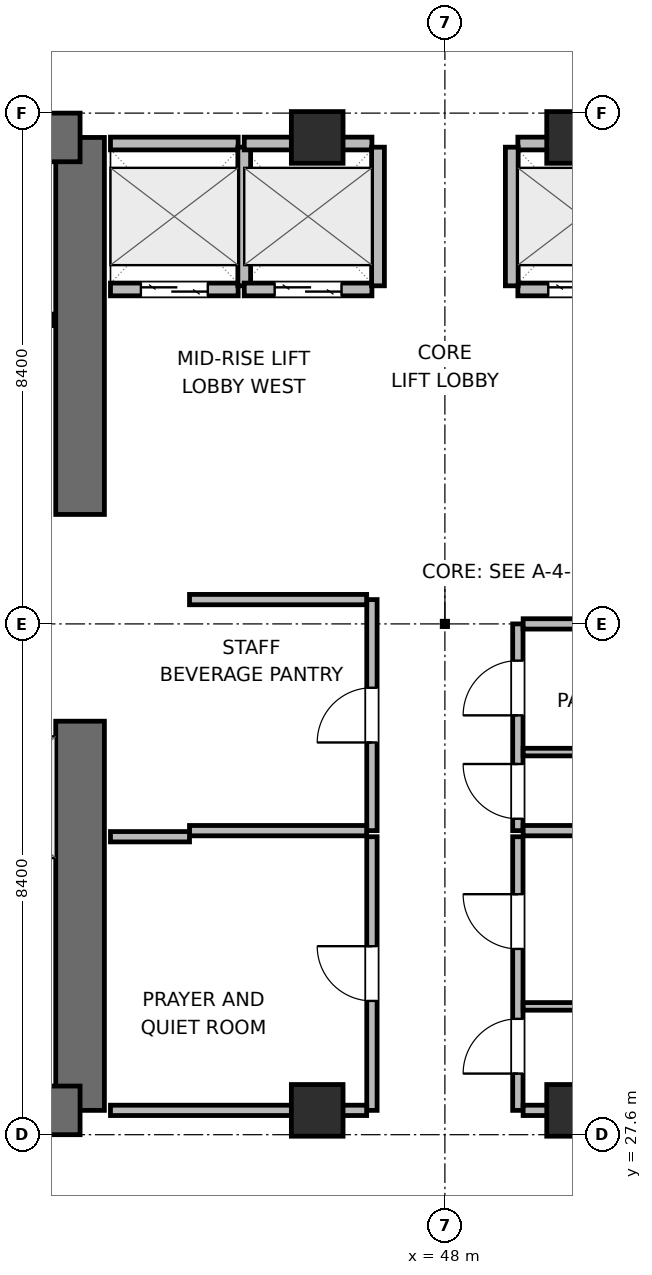
"""IFC4 building model, lengths in metres.
Left out: names, types, materials, properties, quantities, classifications, styles, units other than length and angle.
Written with IfcOpenShell. Run it as: python <this file> out.ifc"""

import sys

from ifc_helpers import new_model, si_unit, direction, frame, frame_2d, origin, origin_2d, place, context, subcontext, project, spatial, rectangle, extrude, element, fill, save


model = new_model("IFC4")
c1 = context("Model", 3, precision=1e-05, world=origin(), true_north=direction((0.0, 1.0)))
c2 = subcontext(c1, "Body", "Model", "MODEL_VIEW")
j1 = project(units=[si_unit("LENGTHUNIT", "METRE"), si_unit("PLANEANGLEUNIT", "RADIAN")], contexts=[c1])
p1 = place(None, origin())
s1 = spatial("IfcSite", under=j1, at=p1, CompositionType="ELEMENT")
p2 = place(p1, origin())
s2 = spatial("IfcBuilding", under=s1, at=p2, CompositionType="ELEMENT")
p3 = place(p2, frame((0.0, 0.0, 150.6)))
s3 = spatial("IfcBuildingStorey", under=s2, at=p3, CompositionType="ELEMENT", Elevation=150.6)
p4 = place(p3, frame((42.0, 28.0, 0.0), z_axis=(0.0, 0.0, 1.0), x_axis=(0.0, 1.0, 0.0)))
e1 = element("IfcWall", 1, at=p4, inside=s3, PredefinedType="SHEAR", context=c2, shape_type="SweptSolid", body=[
    extrude(rectangle(XDim=6.4, YDim=0.8, at=frame_2d((3.2, 0.0))), origin(), (0.0, 0.0, 1.0), 3.9),
])
p5 = place(p3, frame((42.0, 37.8, 0.0), z_axis=(0.0, 0.0, 1.0), x_axis=(0.0, 1.0, 0.0)))
e2 = element("IfcWall", 2, at=p5, inside=s3, PredefinedType="SHEAR", context=c2, shape_type="SweptSolid", body=[
    extrude(rectangle(XDim=6.2, YDim=0.8, at=frame_2d((3.1, 0.0))), origin(), (0.0, 0.0, 1.0), 3.9),
])
p6 = place(p3, frame((32.8, 28.0, 0.0), z_axis=(0.0, 0.0, 1.0), x_axis=(1.0, 0.0, 0.0)))
e3 = element("IfcWall", 3, at=p6, inside=s3, PredefinedType="SHEAR", context=c2, shape_type="SweptSolid", body=[
    extrude(rectangle(XDim=9.2, YDim=0.8, at=frame_2d((4.6, 0.0))), origin(), (0.0, 0.0, 1.0), 3.9),
])
p7 = place(p6, frame((5.025, 0.0, 0.0)))
e4 = element("IfcOpeningElement", 4, at=p7, cuts=e3, PredefinedType="OPENING", context=c2, shape_type="SweptSolid", body=[
    extrude(rectangle(XDim=1.05, YDim=2.04, at=frame_2d((0.525, 1.02))), frame((0.0, 0.41, 0.0), z_axis=(0.0, -1.0, 0.0), x_axis=(1.0, 0.0, 0.0)), (0.0, 0.0, 1.0), 0.82),
])
p8 = place(p3, frame((32.8, 44.0, 0.0), z_axis=(0.0, 0.0, 1.0), x_axis=(1.0, 0.0, 0.0)))
e5 = element("IfcWall", 5, at=p8, inside=s3, PredefinedType="SHEAR", context=c2, shape_type="SweptSolid", body=[
    extrude(rectangle(XDim=9.2, YDim=0.8, at=frame_2d((4.6, 0.0))), origin(), (0.0, 0.0, 1.0), 3.9),
])
p9 = place(p8, frame((1.025, 0.0, 0.0)))
e6 = element("IfcOpeningElement", 6, at=p9, cuts=e5, PredefinedType="OPENING", context=c2, shape_type="SweptSolid", body=[
    extrude(rectangle(XDim=0.95, YDim=2.04, at=frame_2d((0.475, 1.02))), frame((0.0, 0.41, 0.0), z_axis=(0.0, -1.0, 0.0), x_axis=(1.0, 0.0, 0.0)), (0.0, 0.0, 1.0), 0.82),
])
p10 = place(p8, frame((4.275, 0.0, 0.0)))
e7 = element("IfcOpeningElement", 7, at=p10, cuts=e5, PredefinedType="OPENING", context=c2, shape_type="SweptSolid", body=[
    extrude(rectangle(XDim=0.9, YDim=2.02, at=frame_2d((0.45, 1.01))), frame((0.0, 0.41, 0.0), z_axis=(0.0, -1.0, 0.0), x_axis=(1.0, 0.0, 0.0)), (0.0, 0.0, 1.0), 0.82),
])
p11 = place(p8, frame((7.175, 0.0, 0.0)))
e8 = element("IfcOpeningElement", 8, at=p11, cuts=e5, PredefinedType="OPENING", context=c2, shape_type="SweptSolid", body=[
    extrude(rectangle(XDim=0.9, YDim=2.02, at=frame_2d((0.45, 1.01))), frame((0.0, 0.41, 0.0), z_axis=(0.0, -1.0, 0.0), x_axis=(1.0, 0.0, 0.0)), (0.0, 0.0, 1.0), 0.82),
])
for number, where, z_axis, x_axis in (
    (9, (45.9, 28.0, 0.0), (0.0, 0.0, 1.0), (1.0, 0.0, 0.0)),
    (10, (50.1, 28.0, 0.0), (0.0, 0.0, 1.0), (1.0, 0.0, 0.0)),
    (11, (45.9, 44.0, 0.0), (0.0, 0.0, 1.0), (1.0, 0.0, 0.0)),
    (12, (50.1, 44.0, 0.0), (0.0, 0.0, 1.0), (1.0, 0.0, 0.0)),
):
    element("IfcColumn", number, at=place(p3, frame(where, z_axis=z_axis, x_axis=x_axis)), inside=s3, PredefinedType="COLUMN", context=c2, shape_type="SweptSolid", body=[
        extrude(rectangle(XDim=0.85, YDim=0.85, at=origin_2d()), origin(), (0.0, 0.0, 1.0), 3.9),
    ])
p12 = place(p3, frame((33.25, 41.0, 0.0), z_axis=(0.0, 0.0, 1.0), x_axis=(1.0, 0.0, 0.0)))
e13 = element("IfcWall", 13, at=p12, inside=s3, PredefinedType="PLUMBINGWALL", context=c2, shape_type="SweptSolid", body=[
    extrude(rectangle(XDim=8.3, YDim=0.19, at=frame_2d((4.15, 0.0))), origin(), (0.0, 0.0, 1.0), 3.68),
])
p13 = place(p3, frame((42.5, 41.5, 0.0), z_axis=(0.0, 0.0, 1.0), x_axis=(1.0, 0.0, 0.0)))
e14 = element("IfcWall", 14, at=p13, inside=s3, PredefinedType="PARTITIONING", context=c2, shape_type="SweptSolid", body=[
    extrude(rectangle(XDim=2.1, YDim=0.21, at=frame_2d((1.05, 0.0))), origin(), (0.0, 0.0, 1.0), 3.68),
])
p14 = place(p13, frame((0.5, 0.0, 0.0)))
e15 = element("IfcOpeningElement", 15, at=p14, cuts=e14, PredefinedType="OPENING", context=c2, shape_type="SweptSolid", body=[
    extrude(rectangle(XDim=1.1, YDim=2.04, at=frame_2d((0.55, 1.02))), frame((0.0, 0.115, 0.0), z_axis=(0.0, -1.0, 0.0), x_axis=(1.0, 0.0, 0.0)), (0.0, 0.0, 1.0), 0.23),
])
p15 = place(p3, frame((42.5, 43.9, 0.0), z_axis=(0.0, 0.0, 1.0), x_axis=(1.0, 0.0, 0.0)))
e16 = element("IfcWall", 16, at=p15, inside=s3, PredefinedType="PARTITIONING", context=c2, shape_type="SweptSolid", body=[
    extrude(rectangle(XDim=2.1, YDim=0.21, at=frame_2d((1.05, 0.0))), origin(), (0.0, 0.0, 1.0), 2.565),
])
p16 = place(p3, frame((44.7, 41.56, 0.0), z_axis=(0.0, 0.0, 1.0), x_axis=(0.0, 1.0, 0.0)))
e17 = element("IfcWall", 17, at=p16, inside=s3, PredefinedType="PARTITIONING", context=c2, shape_type="SweptSolid", body=[
    extrude(rectangle(XDim=2.28, YDim=0.21, at=frame_2d((1.14, 0.0))), origin(), (0.0, 0.0, 1.0), 3.68),
])
p17 = place(p3, frame((44.7, 41.5, 0.0), z_axis=(0.0, 0.0, 1.0), x_axis=(1.0, 0.0, 0.0)))
e18 = element("IfcWall", 18, at=p17, inside=s3, PredefinedType="PARTITIONING", context=c2, shape_type="SweptSolid", body=[
    extrude(rectangle(XDim=2.1, YDim=0.21, at=frame_2d((1.05, 0.0))), origin(), (0.0, 0.0, 1.0), 3.68),
])
p18 = place(p17, frame((0.5, 0.0, 0.0)))
e19 = element("IfcOpeningElement", 19, at=p18, cuts=e18, PredefinedType="OPENING", context=c2, shape_type="SweptSolid", body=[
    extrude(rectangle(XDim=1.1, YDim=2.04, at=frame_2d((0.55, 1.02))), frame((0.0, 0.115, 0.0), z_axis=(0.0, -1.0, 0.0), x_axis=(1.0, 0.0, 0.0)), (0.0, 0.0, 1.0), 0.23),
])
p19 = place(p3, frame((44.7, 43.9, 0.0), z_axis=(0.0, 0.0, 1.0), x_axis=(1.0, 0.0, 0.0)))
e20 = element("IfcWall", 20, at=p19, inside=s3, PredefinedType="PARTITIONING", context=c2, shape_type="SweptSolid", body=[
    extrude(rectangle(XDim=2.1, YDim=0.21, at=frame_2d((1.05, 0.0))), origin(), (0.0, 0.0, 1.0), 2.565),
])
p20 = place(p3, frame((46.9, 41.56, 0.0), z_axis=(0.0, 0.0, 1.0), x_axis=(0.0, 1.0, 0.0)))
e21 = element("IfcWall", 21, at=p20, inside=s3, PredefinedType="PARTITIONING", context=c2, shape_type="SweptSolid", body=[
    extrude(rectangle(XDim=2.28, YDim=0.21, at=frame_2d((1.14, 0.0))), origin(), (0.0, 0.0, 1.0), 3.68),
])
p21 = place(p3, frame((49.2, 41.5, 0.0), z_axis=(0.0, 0.0, 1.0), x_axis=(1.0, 0.0, 0.0)))
e22 = element("IfcWall", 22, at=p21, inside=s3, PredefinedType="PARTITIONING", context=c2, shape_type="SweptSolid", body=[
    extrude(rectangle(XDim=2.1, YDim=0.21, at=frame_2d((1.05, 0.0))), origin(), (0.0, 0.0, 1.0), 3.68),
])
p22 = place(p21, frame((0.5, 0.0, 0.0)))
e23 = element("IfcOpeningElement", 23, at=p22, cuts=e22, PredefinedType="OPENING", context=c2, shape_type="SweptSolid", body=[
    extrude(rectangle(XDim=1.1, YDim=2.04, at=frame_2d((0.55, 1.02))), frame((0.0, 0.115, 0.0), z_axis=(0.0, -1.0, 0.0), x_axis=(1.0, 0.0, 0.0)), (0.0, 0.0, 1.0), 0.23),
])
p23 = place(p3, frame((49.2, 43.9, 0.0), z_axis=(0.0, 0.0, 1.0), x_axis=(1.0, 0.0, 0.0)))
e24 = element("IfcWall", 24, at=p23, inside=s3, PredefinedType="PARTITIONING", context=c2, shape_type="SweptSolid", body=[
    extrude(rectangle(XDim=2.1, YDim=0.21, at=frame_2d((1.05, 0.0))), origin(), (0.0, 0.0, 1.0), 2.565),
])
p24 = place(p3, frame((49.1, 41.56, 0.0), z_axis=(0.0, 0.0, 1.0), x_axis=(0.0, 1.0, 0.0)))
e25 = element("IfcWall", 25, at=p24, inside=s3, PredefinedType="PARTITIONING", context=c2, shape_type="SweptSolid", body=[
    extrude(rectangle(XDim=2.28, YDim=0.21, at=frame_2d((1.14, 0.0))), origin(), (0.0, 0.0, 1.0), 3.68),
])
p25 = place(p3, frame((46.8, 32.6, 0.0), z_axis=(0.0, 0.0, 1.0), x_axis=(0.0, 1.0, 0.0)))
e26 = element("IfcWall", 26, at=p25, inside=s3, PredefinedType="PARTITIONING", context=c2, shape_type="SweptSolid", body=[
    extrude(rectangle(XDim=3.8, YDim=0.17, at=frame_2d((1.9, 0.0))), origin(), (0.0, 0.0, 1.0), 3.68),
])
p26 = place(p25, frame((1.45, 0.0, 0.0)))
e27 = element("IfcOpeningElement", 27, at=p26, cuts=e26, PredefinedType="OPENING", context=c2, shape_type="SweptSolid", body=[
    extrude(rectangle(XDim=0.9, YDim=2.02, at=frame_2d((0.45, 1.01))), frame((0.0, 0.095, 0.0), z_axis=(0.0, -1.0, 0.0), x_axis=(1.0, 0.0, 0.0)), (0.0, 0.0, 1.0), 0.19),
])
for number, where, z_axis, x_axis in (
    (28, (43.8, 32.6, 0.0), (0.0, 0.0, 1.0), (1.0, 0.0, 0.0)),
    (29, (43.8, 36.4, 0.0), (0.0, 0.0, 1.0), (1.0, 0.0, 0.0)),
):
    element("IfcWall", number, at=place(p3, frame(where, z_axis=z_axis, x_axis=x_axis)), inside=s3, PredefinedType="PARTITIONING", context=c2, shape_type="SweptSolid", body=[
        extrude(rectangle(XDim=2.913, YDim=0.17, at=frame_2d((1.457, 0.0))), origin(), (0.0, 0.0, 1.0), 3.68),
    ])
p27 = place(p3, frame((49.2, 32.6, 0.0), z_axis=(0.0, 0.0, 1.0), x_axis=(0.0, 1.0, 0.0)))
e30 = element("IfcWall", 30, at=p27, inside=s3, PredefinedType="PARTITIONING", context=c2, shape_type="SweptSolid", body=[
    extrude(rectangle(XDim=3.4, YDim=0.17, at=frame_2d((1.7, 0.0))), origin(), (0.0, 0.0, 1.0), 3.68),
])
p28 = place(p27, frame((0.196, 0.0, 0.0)))
e31 = element("IfcOpeningElement", 31, at=p28, cuts=e30, PredefinedType="OPENING", context=c2, shape_type="SweptSolid", body=[
    extrude(rectangle(XDim=0.9, YDim=2.02, at=frame_2d((0.45, 1.01))), frame((0.0, 0.095, 0.0), z_axis=(0.0, -1.0, 0.0), x_axis=(1.0, 0.0, 0.0)), (0.0, 0.0, 1.0), 0.19),
])
p29 = place(p27, frame((1.896, 0.0, 0.0)))
e32 = element("IfcOpeningElement", 32, at=p29, cuts=e30, PredefinedType="OPENING", context=c2, shape_type="SweptSolid", body=[
    extrude(rectangle(XDim=0.9, YDim=2.02, at=frame_2d((0.45, 1.01))), frame((0.0, 0.095, 0.0), z_axis=(0.0, -1.0, 0.0), x_axis=(1.0, 0.0, 0.0)), (0.0, 0.0, 1.0), 0.19),
])
for number, where, z_axis, x_axis in (
    (33, (49.287, 32.6, 0.0), (0.0, 0.0, 1.0), (1.0, 0.0, 0.0)),
    (34, (49.287, 36.0, 0.0), (0.0, 0.0, 1.0), (1.0, 0.0, 0.0)),
):
    element("IfcWall", number, at=place(p3, frame(where, z_axis=z_axis, x_axis=x_axis)), inside=s3, PredefinedType="PARTITIONING", context=c2, shape_type="SweptSolid", body=[
        extrude(rectangle(XDim=2.913, YDim=0.17, at=frame_2d((1.457, 0.0))), origin(), (0.0, 0.0, 1.0), 3.68),
    ])
p30 = place(p3, frame((49.287, 33.892, 0.0), z_axis=(0.0, 0.0, 1.0), x_axis=(1.0, 0.0, 0.0)))
e35 = element("IfcWall", 35, at=p30, inside=s3, PredefinedType="PARTITIONING", context=c2, shape_type="SweptSolid", body=[
    extrude(rectangle(XDim=2.913, YDim=0.125, at=frame_2d((1.457, 0.0))), origin(), (0.0, 0.0, 1.0), 3.68),
])
p31 = place(p3, frame((46.8, 28.0, 0.0), z_axis=(0.0, 0.0, 1.0), x_axis=(0.0, 1.0, 0.0)))
e36 = element("IfcWall", 36, at=p31, inside=s3, PredefinedType="PARTITIONING", context=c2, shape_type="SweptSolid", body=[
    extrude(rectangle(XDim=4.5, YDim=0.17, at=frame_2d((2.25, 0.0))), origin(), (0.0, 0.0, 1.0), 3.68),
])
p32 = place(p31, frame((1.8, 0.0, 0.0)))
e37 = element("IfcOpeningElement", 37, at=p32, cuts=e36, PredefinedType="OPENING", context=c2, shape_type="SweptSolid", body=[
    extrude(rectangle(XDim=0.9, YDim=2.02, at=frame_2d((0.45, 1.01))), frame((0.0, 0.095, 0.0), z_axis=(0.0, -1.0, 0.0), x_axis=(1.0, 0.0, 0.0)), (0.0, 0.0, 1.0), 0.19),
])
p33 = place(p3, frame((42.5, 28.0, 0.0), z_axis=(0.0, 0.0, 1.0), x_axis=(1.0, 0.0, 0.0)))
e38 = element("IfcWall", 38, at=p33, inside=s3, PredefinedType="PARTITIONING", context=c2, shape_type="SweptSolid", body=[
    extrude(rectangle(XDim=4.213, YDim=0.17, at=frame_2d((2.106, 0.0))), origin(), (0.0, 0.0, 1.0), 2.565),
])
p34 = place(p3, frame((42.5, 32.5, 0.0), z_axis=(0.0, 0.0, 1.0), x_axis=(1.0, 0.0, 0.0)))
e39 = element("IfcWall", 39, at=p34, inside=s3, PredefinedType="PARTITIONING", context=c2, shape_type="SweptSolid", body=[
    extrude(rectangle(XDim=1.3, YDim=0.17, at=frame_2d((0.65, 0.0))), origin(), (0.0, 0.0, 1.0), 3.68),
])
p35 = place(p3, frame((49.2, 28.0, 0.0), z_axis=(0.0, 0.0, 1.0), x_axis=(0.0, 1.0, 0.0)))
e40 = element("IfcWall", 40, at=p35, inside=s3, PredefinedType="PARTITIONING", context=c2, shape_type="SweptSolid", body=[
    extrude(rectangle(XDim=4.5, YDim=0.17, at=frame_2d((2.25, 0.0))), origin(), (0.0, 0.0, 1.0), 3.68),
])
p36 = place(p35, frame((0.605, 0.0, 0.0)))
e41 = element("IfcOpeningElement", 41, at=p36, cuts=e40, PredefinedType="OPENING", context=c2, shape_type="SweptSolid", body=[
    extrude(rectangle(XDim=0.9, YDim=2.02, at=frame_2d((0.45, 1.01))), frame((0.0, 0.095, 0.0), z_axis=(0.0, -1.0, 0.0), x_axis=(1.0, 0.0, 0.0)), (0.0, 0.0, 1.0), 0.19),
])
p37 = place(p35, frame((2.655, 0.0, 0.0)))
e42 = element("IfcOpeningElement", 42, at=p37, cuts=e40, PredefinedType="OPENING", context=c2, shape_type="SweptSolid", body=[
    extrude(rectangle(XDim=0.9, YDim=2.02, at=frame_2d((0.45, 1.01))), frame((0.0, 0.095, 0.0), z_axis=(0.0, -1.0, 0.0), x_axis=(1.0, 0.0, 0.0)), (0.0, 0.0, 1.0), 0.19),
])
p38 = place(p3, frame((49.287, 28.0, 0.0), z_axis=(0.0, 0.0, 1.0), x_axis=(1.0, 0.0, 0.0)))
e43 = element("IfcWall", 43, at=p38, inside=s3, PredefinedType="PARTITIONING", context=c2, shape_type="SweptSolid", body=[
    extrude(rectangle(XDim=4.213, YDim=0.17, at=frame_2d((2.106, 0.0))), origin(), (0.0, 0.0, 1.0), 2.565),
])
p39 = place(p3, frame((49.287, 29.71, 0.0), z_axis=(0.0, 0.0, 1.0), x_axis=(1.0, 0.0, 0.0)))
e44 = element("IfcWall", 44, at=p39, inside=s3, PredefinedType="PARTITIONING", context=c2, shape_type="SweptSolid", body=[
    extrude(rectangle(XDim=4.213, YDim=0.125, at=frame_2d((2.106, 0.0))), origin(), (0.0, 0.0, 1.0), 3.68),
])
p40 = place(p14, origin())
e45 = element("IfcDoor", 45, at=p40, inside=s3, OperationType="DOUBLE_DOOR_SLIDING", PredefinedType="DOOR", context=c2, shape_type="SweptSolid", body=[
    extrude(rectangle(XDim=1.1, YDim=2.04, at=frame_2d((0.55, 1.02))), frame((0.0, 0.025, 0.0), z_axis=(0.0, -1.0, 0.0), x_axis=(1.0, 0.0, 0.0)), (0.0, 0.0, 1.0), 0.05),
])
fill(e15, e45)
p41 = place(p18, origin())
e46 = element("IfcDoor", 46, at=p41, inside=s3, OperationType="DOUBLE_DOOR_SLIDING", PredefinedType="DOOR", context=c2, shape_type="SweptSolid", body=[
    extrude(rectangle(XDim=1.1, YDim=2.04, at=frame_2d((0.55, 1.02))), frame((0.0, 0.025, 0.0), z_axis=(0.0, -1.0, 0.0), x_axis=(1.0, 0.0, 0.0)), (0.0, 0.0, 1.0), 0.05),
])
fill(e19, e46)
p42 = place(p22, origin())
e47 = element("IfcDoor", 47, at=p42, inside=s3, OperationType="DOUBLE_DOOR_SLIDING", PredefinedType="DOOR", context=c2, shape_type="SweptSolid", body=[
    extrude(rectangle(XDim=1.1, YDim=2.04, at=frame_2d((0.55, 1.02))), frame((0.0, 0.025, 0.0), z_axis=(0.0, -1.0, 0.0), x_axis=(1.0, 0.0, 0.0)), (0.0, 0.0, 1.0), 0.05),
])
fill(e23, e47)
p43 = place(p26, origin())
e48 = element("IfcDoor", 48, at=p43, inside=s3, OperationType="SINGLE_SWING_LEFT", PredefinedType="DOOR", context=c2, shape_type="SweptSolid", body=[
    extrude(rectangle(XDim=0.9, YDim=2.02, at=frame_2d((0.45, 1.01))), frame((0.0, 0.025, 0.0), z_axis=(0.0, -1.0, 0.0), x_axis=(1.0, 0.0, 0.0)), (0.0, 0.0, 1.0), 0.05),
])
fill(e27, e48)
p44 = place(p28, origin())
e49 = element("IfcDoor", 49, at=p44, inside=s3, OperationType="SINGLE_SWING_RIGHT", PredefinedType="DOOR", context=c2, shape_type="SweptSolid", body=[
    extrude(rectangle(XDim=0.9, YDim=2.02, at=frame_2d((0.45, 1.01))), frame((0.0, 0.025, 0.0), z_axis=(0.0, -1.0, 0.0), x_axis=(1.0, 0.0, 0.0)), (0.0, 0.0, 1.0), 0.05),
])
fill(e31, e49)
p45 = place(p29, origin())
e50 = element("IfcDoor", 50, at=p45, inside=s3, OperationType="SINGLE_SWING_LEFT", PredefinedType="DOOR", context=c2, shape_type="SweptSolid", body=[
    extrude(rectangle(XDim=0.9, YDim=2.02, at=frame_2d((0.45, 1.01))), frame((0.0, 0.025, 0.0), z_axis=(0.0, -1.0, 0.0), x_axis=(1.0, 0.0, 0.0)), (0.0, 0.0, 1.0), 0.05),
])
fill(e32, e50)
p46 = place(p32, origin())
e51 = element("IfcDoor", 51, at=p46, inside=s3, OperationType="SINGLE_SWING_RIGHT", PredefinedType="DOOR", context=c2, shape_type="SweptSolid", body=[
    extrude(rectangle(XDim=0.9, YDim=2.02, at=frame_2d((0.45, 1.01))), frame((0.0, 0.025, 0.0), z_axis=(0.0, -1.0, 0.0), x_axis=(1.0, 0.0, 0.0)), (0.0, 0.0, 1.0), 0.05),
])
fill(e37, e51)
p47 = place(p36, origin())
e52 = element("IfcDoor", 52, at=p47, inside=s3, OperationType="SINGLE_SWING_LEFT", PredefinedType="DOOR", context=c2, shape_type="SweptSolid", body=[
    extrude(rectangle(XDim=0.9, YDim=2.02, at=frame_2d((0.45, 1.01))), frame((0.0, 0.025, 0.0), z_axis=(0.0, -1.0, 0.0), x_axis=(1.0, 0.0, 0.0)), (0.0, 0.0, 1.0), 0.05),
])
fill(e41, e52)
p48 = place(p37, origin())
e53 = element("IfcDoor", 53, at=p48, inside=s3, OperationType="SINGLE_SWING_RIGHT", PredefinedType="DOOR", context=c2, shape_type="SweptSolid", body=[
    extrude(rectangle(XDim=0.9, YDim=2.02, at=frame_2d((0.45, 1.01))), frame((0.0, 0.025, 0.0), z_axis=(0.0, -1.0, 0.0), x_axis=(1.0, 0.0, 0.0)), (0.0, 0.0, 1.0), 0.05),
])
fill(e42, e53)
save(model, sys.argv[1])
